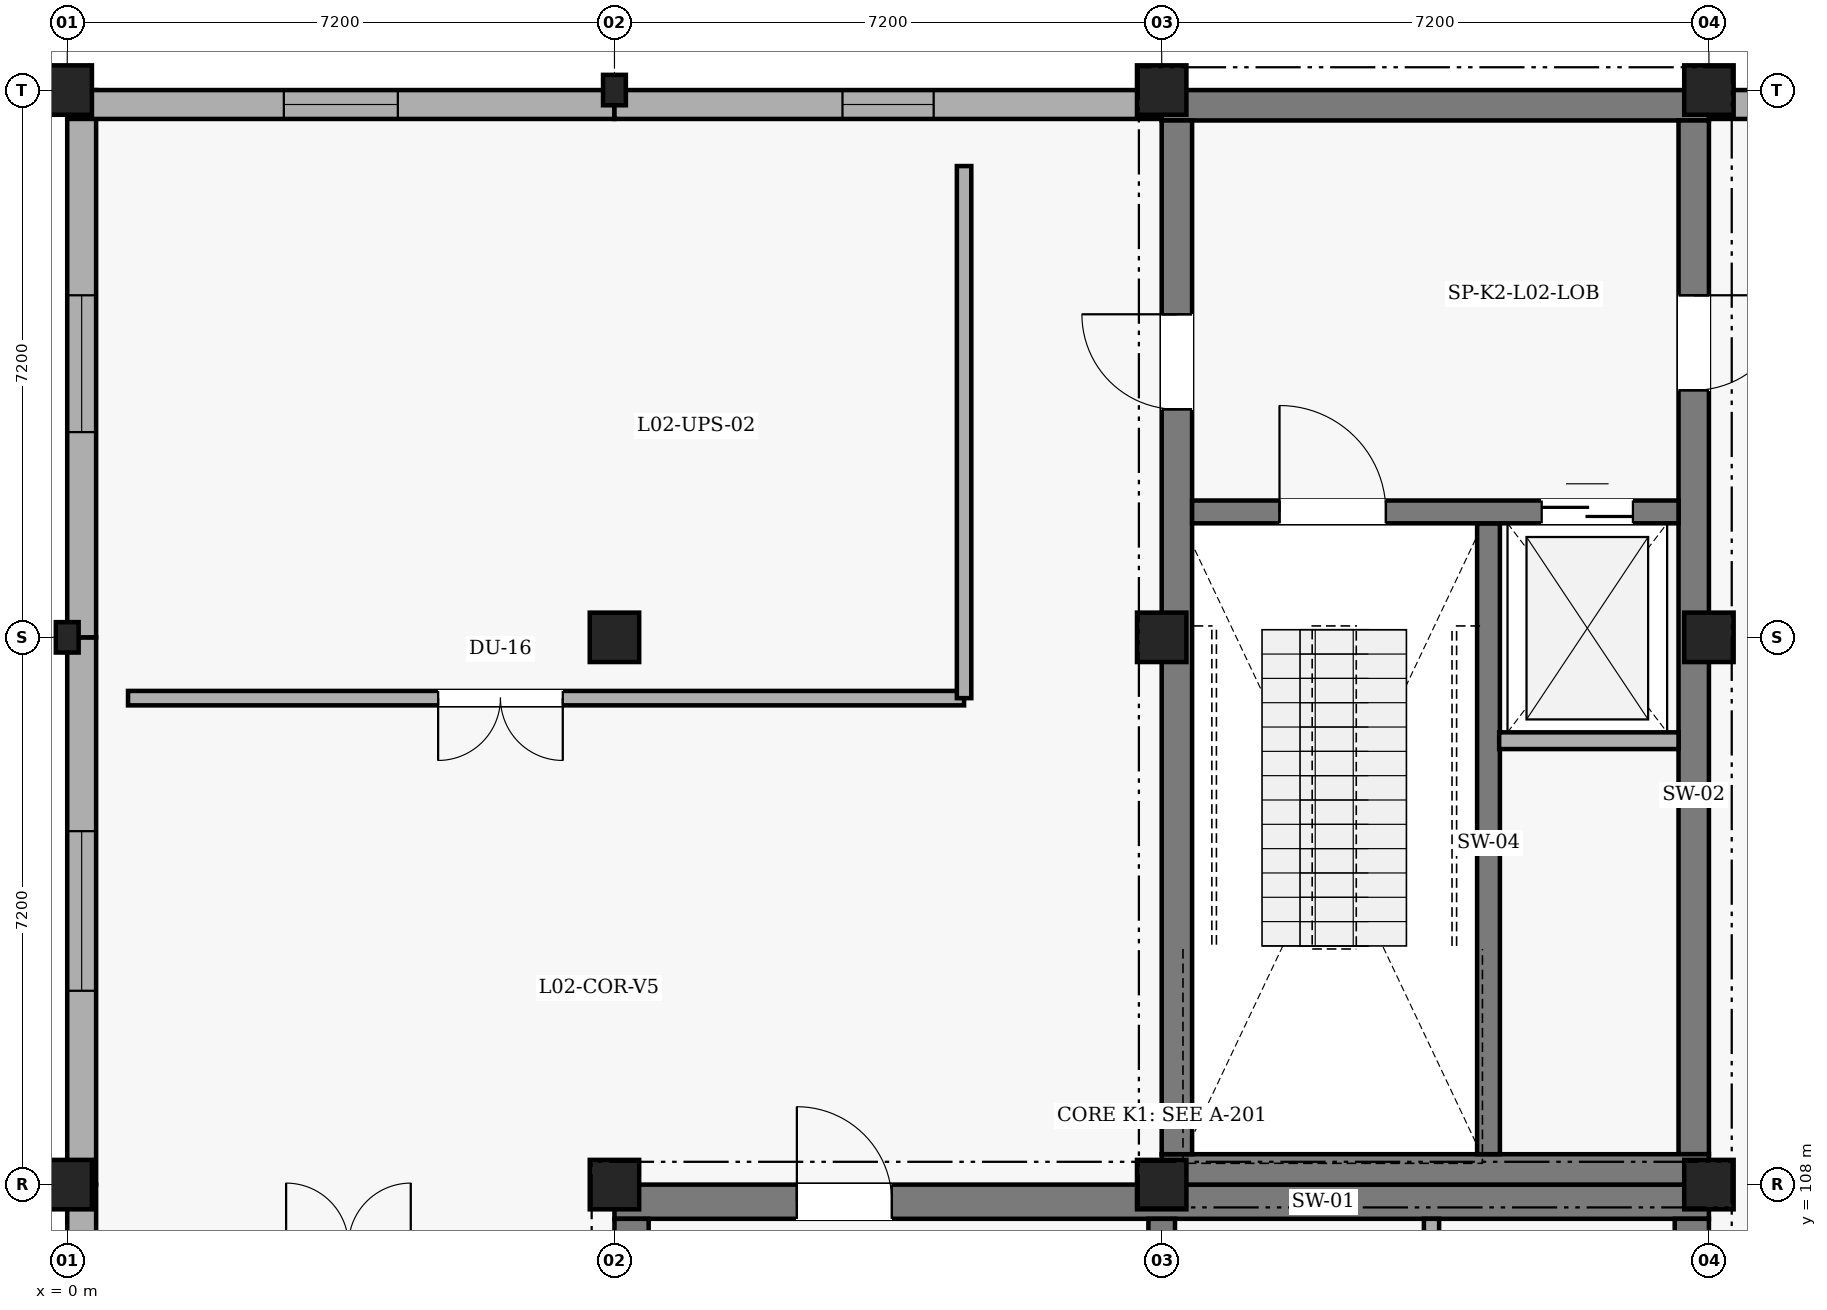
"""IFC4 building model, lengths in metres.
Left out: names, types, materials, properties, quantities, classifications, styles, units other than length and angle.
Written with IfcOpenShell. Run it as: python <this file> out.ifc"""

import sys

from ifc_helpers import new_model, si_unit, direction, frame, frame_2d, origin, origin_2d, place, context, subcontext, project, spatial, rectangle, extrude, element, fill, save


model = new_model("IFC4")
c1 = context("Model", 3, precision=1e-05, world=origin(), true_north=direction((0.0, 1.0)))
c2 = subcontext(c1, "Body", "Model", "MODEL_VIEW")
j1 = project(units=[si_unit("LENGTHUNIT", "METRE"), si_unit("PLANEANGLEUNIT", "RADIAN")], contexts=[c1])
p1 = place(None, origin())
s1 = spatial("IfcSite", under=j1, at=p1, CompositionType="ELEMENT")
p2 = place(p1, origin())
s2 = spatial("IfcBuilding", under=s1, at=p2, CompositionType="ELEMENT")
p3 = place(p2, frame((0.0, 0.0, 9.6)))
s3 = spatial("IfcBuildingStorey", under=s2, at=p3, CompositionType="ELEMENT", Elevation=9.6)
p4 = place(p3, frame((7.2, 107.775, 0.0), z_axis=(0.0, 0.0, 1.0), x_axis=(1.0, 0.0, 0.0)))
e1 = element("IfcWall", 1, at=p4, inside=s3, PredefinedType="SHEAR", context=c2, shape_type="SweptSolid", body=[
    extrude(rectangle(XDim=14.4, YDim=0.45, at=frame_2d((7.2, 0.0))), origin(), (0.0, 0.0, 1.0), 4.2),
])
p5 = place(p4, frame((2.4, 0.0, 0.0)))
e2 = element("IfcOpeningElement", 2, at=p5, cuts=e1, PredefinedType="OPENING", context=c2, shape_type="SweptSolid", body=[
    extrude(rectangle(XDim=1.25, YDim=2.2, at=frame_2d((0.625, 1.1))), frame((0.0, 0.235, 0.0), z_axis=(0.0, -1.0, 0.0), x_axis=(1.0, 0.0, 0.0)), (0.0, 0.0, 1.0), 0.47),
])
p6 = place(p3, frame((21.375, 107.55, 0.0), z_axis=(0.0, 0.0, 1.0), x_axis=(0.0, -1.0, 0.0)))
e3 = element("IfcWall", 3, at=p6, inside=s3, PredefinedType="SHEAR", context=c2, shape_type="SweptSolid", body=[
    extrude(rectangle(XDim=13.5, YDim=0.45, at=frame_2d((6.75, 0.0))), origin(), (0.0, 0.0, 1.0), 4.2),
])
p7 = place(p6, frame((9.8, 0.0, 0.0)))
e4 = element("IfcOpeningElement", 4, at=p7, cuts=e3, PredefinedType="OPENING", context=c2, shape_type="SweptSolid", body=[
    extrude(rectangle(XDim=1.0, YDim=2.15, at=frame_2d((0.5, 1.075))), frame((0.0, 0.235, 0.0), z_axis=(0.0, -1.0, 0.0), x_axis=(1.0, 0.0, 0.0)), (0.0, 0.0, 1.0), 0.47),
])
p8 = place(p6, frame((2.3, 0.0, 0.0)))
e5 = element("IfcOpeningElement", 5, at=p8, cuts=e3, PredefinedType="OPENING", context=c2, shape_type="SweptSolid", body=[
    extrude(rectangle(XDim=1.25, YDim=2.2, at=frame_2d((0.625, 1.1))), frame((0.0, 0.235, 0.0), z_axis=(0.0, -1.0, 0.0), x_axis=(1.0, 0.0, 0.0)), (0.0, 0.0, 1.0), 0.47),
])
p9 = place(p3, frame((7.425, 94.05, 0.0), z_axis=(0.0, 0.0, 1.0), x_axis=(0.0, 1.0, 0.0)))
e6 = element("IfcWall", 6, at=p9, inside=s3, PredefinedType="SHEAR", context=c2, shape_type="SweptSolid", body=[
    extrude(rectangle(XDim=13.5, YDim=0.45, at=frame_2d((6.75, 0.0))), origin(), (0.0, 0.0, 1.0), 4.2),
])
p10 = place(p3, frame((14.4, 107.55, 0.0), z_axis=(0.0, 0.0, 1.0), x_axis=(0.0, -1.0, 0.0)))
e7 = element("IfcWall", 7, at=p10, inside=s3, PredefinedType="SHEAR", context=c2, shape_type="SweptSolid", body=[
    extrude(rectangle(XDim=13.5, YDim=0.35, at=frame_2d((6.75, 0.0))), origin(), (0.0, 0.0, 1.0), 4.2),
])
p11 = place(p10, frame((1.4, 0.0, 0.0)))
e8 = element("IfcOpeningElement", 8, at=p11, cuts=e7, PredefinedType="OPENING", context=c2, shape_type="SweptSolid", body=[
    extrude(rectangle(XDim=1.25, YDim=2.2, at=frame_2d((0.625, 1.1))), frame((0.0, 0.185, 0.0), z_axis=(0.0, -1.0, 0.0), x_axis=(1.0, 0.0, 0.0)), (0.0, 0.0, 1.0), 0.37),
])
p12 = place(p3, frame((14.4, 122.2, 0.0), z_axis=(0.0, 0.0, 1.0), x_axis=(1.0, 0.0, 0.0)))
e9 = element("IfcWall", 9, at=p12, inside=s3, PredefinedType="SHEAR", context=c2, shape_type="SweptSolid", body=[
    extrude(rectangle(XDim=7.2, YDim=0.4, at=frame_2d((3.6, 0.0))), origin(), (0.0, 0.0, 1.0), 4.2),
])
p13 = place(p3, frame((21.4, 122.0, 0.0), z_axis=(0.0, 0.0, 1.0), x_axis=(0.0, -1.0, 0.0)))
e10 = element("IfcWall", 10, at=p13, inside=s3, PredefinedType="SHEAR", context=c2, shape_type="SweptSolid", body=[
    extrude(rectangle(XDim=13.6, YDim=0.4, at=frame_2d((6.8, 0.0))), origin(), (0.0, 0.0, 1.0), 4.2),
])
p14 = place(p13, frame((2.3, 0.0, 0.0)))
e11 = element("IfcOpeningElement", 11, at=p14, cuts=e10, PredefinedType="OPENING", context=c2, shape_type="SweptSolid", body=[
    extrude(rectangle(XDim=1.25, YDim=2.2, at=frame_2d((0.625, 1.1))), frame((0.0, 0.21, 0.0), z_axis=(0.0, -1.0, 0.0), x_axis=(1.0, 0.0, 0.0)), (0.0, 0.0, 1.0), 0.42),
])
p15 = place(p3, frame((21.6, 108.2, 0.0), z_axis=(0.0, 0.0, 1.0), x_axis=(-1.0, 0.0, 0.0)))
e12 = element("IfcWall", 12, at=p15, inside=s3, PredefinedType="SHEAR", context=c2, shape_type="SweptSolid", body=[
    extrude(rectangle(XDim=7.2, YDim=0.4, at=frame_2d((3.6, 0.0))), origin(), (0.0, 0.0, 1.0), 4.2),
])
p16 = place(p3, frame((14.6, 108.4, 0.0), z_axis=(0.0, 0.0, 1.0), x_axis=(0.0, 1.0, 0.0)))
e13 = element("IfcWall", 13, at=p16, inside=s3, PredefinedType="SHEAR", context=c2, shape_type="SweptSolid", body=[
    extrude(rectangle(XDim=13.6, YDim=0.4, at=frame_2d((6.8, 0.0))), origin(), (0.0, 0.0, 1.0), 4.2),
])
p17 = place(p16, frame((9.8, 0.0, 0.0)))
e14 = element("IfcOpeningElement", 14, at=p17, cuts=e13, PredefinedType="OPENING", context=c2, shape_type="SweptSolid", body=[
    extrude(rectangle(XDim=1.25, YDim=2.2, at=frame_2d((0.625, 1.1))), frame((0.0, 0.21, 0.0), z_axis=(0.0, -1.0, 0.0), x_axis=(1.0, 0.0, 0.0)), (0.0, 0.0, 1.0), 0.42),
])
p18 = place(p3, frame((18.7, 116.7, 0.0), z_axis=(0.0, 0.0, 1.0), x_axis=(0.0, -1.0, 0.0)))
e15 = element("IfcWall", 15, at=p18, inside=s3, PredefinedType="SHEAR", context=c2, shape_type="SweptSolid", body=[
    extrude(rectangle(XDim=8.3, YDim=0.3, at=frame_2d((4.15, 0.0))), origin(), (0.0, 0.0, 1.0), 4.2),
])
p19 = place(p3, frame((14.8, 116.85, 0.0), z_axis=(0.0, 0.0, 1.0), x_axis=(1.0, 0.0, 0.0)))
e16 = element("IfcWall", 16, at=p19, inside=s3, PredefinedType="SHEAR", context=c2, shape_type="SweptSolid", body=[
    extrude(rectangle(XDim=6.4, YDim=0.3, at=frame_2d((3.2, 0.0))), origin(), (0.0, 0.0, 1.0), 4.2),
])
p20 = place(p19, frame((1.15, 0.0, 0.0)))
e17 = element("IfcOpeningElement", 17, at=p20, cuts=e16, PredefinedType="OPENING", context=c2, shape_type="SweptSolid", body=[
    extrude(rectangle(XDim=1.4, YDim=2.2, at=frame_2d((0.7, 1.1))), frame((0.0, 0.16, 0.0), z_axis=(0.0, -1.0, 0.0), x_axis=(1.0, 0.0, 0.0)), (0.0, 0.0, 1.0), 0.32),
])
p21 = place(p19, frame((4.6, 0.0, 0.0)))
e18 = element("IfcOpeningElement", 18, at=p21, cuts=e16, PredefinedType="OPENING", context=c2, shape_type="SweptSolid", body=[
    extrude(rectangle(XDim=1.2, YDim=2.15, at=frame_2d((0.6, 1.075))), frame((0.0, 0.16, 0.0), z_axis=(0.0, -1.0, 0.0), x_axis=(1.0, 0.0, 0.0)), (0.0, 0.0, 1.0), 0.32),
])
p22 = place(p3, frame((0.0, 108.0, 0.0), z_axis=(0.0, 0.0, 1.0), x_axis=(1.0, 0.0, 0.0)))
e19 = element("IfcColumn", 19, at=p22, inside=s3, PredefinedType="COLUMN", context=c2, shape_type="SweptSolid", body=[
    extrude(rectangle(XDim=0.65, YDim=0.65, at=origin_2d()), origin(), (0.0, 0.0, 1.0), 3.88),
])
p23 = place(p3, frame((0.0, 115.2, 0.0), z_axis=(0.0, 0.0, 1.0), x_axis=(1.0, 0.0, 0.0)))
e20 = element("IfcColumn", 20, at=p23, inside=s3, PredefinedType="PILASTER", context=c2, shape_type="SweptSolid", body=[
    extrude(rectangle(XDim=0.3, YDim=0.4, at=origin_2d()), origin(), (0.0, 0.0, 1.0), 3.88),
])
for number, where, z_axis, x_axis in (
    (21, (0.0, 122.4, 0.0), (0.0, 0.0, 1.0), (1.0, 0.0, 0.0)),
    (22, (7.2, 108.0, 0.0), (0.0, 0.0, 1.0), (1.0, 0.0, 0.0)),
    (23, (7.2, 115.2, 0.0), (0.0, 0.0, 1.0), (1.0, 0.0, 0.0)),
):
    element("IfcColumn", number, at=place(p3, frame(where, z_axis=z_axis, x_axis=x_axis)), inside=s3, PredefinedType="COLUMN", context=c2, shape_type="SweptSolid", body=[
        extrude(rectangle(XDim=0.65, YDim=0.65, at=origin_2d()), origin(), (0.0, 0.0, 1.0), 3.88),
    ])
p24 = place(p3, frame((7.2, 122.4, 0.0), z_axis=(0.0, 0.0, 1.0), x_axis=(1.0, 0.0, 0.0)))
e24 = element("IfcColumn", 24, at=p24, inside=s3, PredefinedType="PILASTER", context=c2, shape_type="SweptSolid", body=[
    extrude(rectangle(XDim=0.3, YDim=0.4, at=origin_2d()), origin(), (0.0, 0.0, 1.0), 3.88),
])
for number, where, z_axis, x_axis in (
    (25, (14.4, 108.0, 0.0), (0.0, 0.0, 1.0), (1.0, 0.0, 0.0)),
    (26, (14.4, 115.2, 0.0), (0.0, 0.0, 1.0), (1.0, 0.0, 0.0)),
    (27, (14.4, 122.4, 0.0), (0.0, 0.0, 1.0), (1.0, 0.0, 0.0)),
    (28, (21.6, 108.0, 0.0), (0.0, 0.0, 1.0), (1.0, 0.0, 0.0)),
    (29, (21.6, 115.2, 0.0), (0.0, 0.0, 1.0), (1.0, 0.0, 0.0)),
    (30, (21.6, 122.4, 0.0), (0.0, 0.0, 1.0), (1.0, 0.0, 0.0)),
):
    element("IfcColumn", number, at=place(p3, frame(where, z_axis=z_axis, x_axis=x_axis)), inside=s3, PredefinedType="COLUMN", context=c2, shape_type="SweptSolid", body=[
        extrude(rectangle(XDim=0.65, YDim=0.65, at=origin_2d()), origin(), (0.0, 0.0, 1.0), 3.88),
    ])
p25 = place(p3, frame((0.19, 100.8, 0.0), z_axis=(0.0, 0.0, 1.0), x_axis=(0.0, 1.0, 0.0)))
e31 = element("IfcWall", 31, at=p25, inside=s3, PredefinedType="SOLIDWALL", context=c2, shape_type="SweptSolid", body=[
    extrude(rectangle(XDim=7.2, YDim=0.38, at=frame_2d((3.6, 0.0))), origin(), (0.0, 0.0, 1.0), 3.58),
])
p26 = place(p25, frame((2.4, 0.0, 0.9)))
e32 = element("IfcOpeningElement", 32, at=p26, cuts=e31, PredefinedType="OPENING", context=c2, shape_type="SweptSolid", body=[
    extrude(rectangle(XDim=2.4, YDim=1.0, at=frame_2d((1.2, 0.5))), frame((0.0, 0.2, 0.0), z_axis=(0.0, -1.0, 0.0), x_axis=(1.0, 0.0, 0.0)), (0.0, 0.0, 1.0), 0.4),
])
p27 = place(p3, frame((0.19, 108.0, 0.0), z_axis=(0.0, 0.0, 1.0), x_axis=(0.0, 1.0, 0.0)))
e33 = element("IfcWall", 33, at=p27, inside=s3, PredefinedType="SOLIDWALL", context=c2, shape_type="SweptSolid", body=[
    extrude(rectangle(XDim=7.2, YDim=0.38, at=frame_2d((3.6, 0.0))), origin(), (0.0, 0.0, 1.0), 3.58),
])
p28 = place(p27, frame((2.55, 0.0, 0.9)))
e34 = element("IfcOpeningElement", 34, at=p28, cuts=e33, PredefinedType="OPENING", context=c2, shape_type="SweptSolid", body=[
    extrude(rectangle(XDim=2.1, YDim=1.8, at=frame_2d((1.05, 0.9))), frame((0.0, 0.2, 0.0), z_axis=(0.0, -1.0, 0.0), x_axis=(1.0, 0.0, 0.0)), (0.0, 0.0, 1.0), 0.4),
])
p29 = place(p3, frame((0.19, 115.2, 0.0), z_axis=(0.0, 0.0, 1.0), x_axis=(0.0, 1.0, 0.0)))
e35 = element("IfcWall", 35, at=p29, inside=s3, PredefinedType="SOLIDWALL", context=c2, shape_type="SweptSolid", body=[
    extrude(rectangle(XDim=7.2, YDim=0.38, at=frame_2d((3.6, 0.0))), origin(), (0.0, 0.0, 1.0), 3.58),
])
p30 = place(p29, frame((2.7, 0.0, 0.9)))
e36 = element("IfcOpeningElement", 36, at=p30, cuts=e35, PredefinedType="OPENING", context=c2, shape_type="SweptSolid", body=[
    extrude(rectangle(XDim=1.8, YDim=1.5, at=frame_2d((0.9, 0.75))), frame((0.0, 0.2, 0.0), z_axis=(0.0, -1.0, 0.0), x_axis=(1.0, 0.0, 0.0)), (0.0, 0.0, 1.0), 0.4),
])
p31 = place(p3, frame((0.0, 122.21, 0.0), z_axis=(0.0, 0.0, 1.0), x_axis=(1.0, 0.0, 0.0)))
e37 = element("IfcWall", 37, at=p31, inside=s3, PredefinedType="SOLIDWALL", context=c2, shape_type="SweptSolid", body=[
    extrude(rectangle(XDim=7.2, YDim=0.38, at=frame_2d((3.6, 0.0))), origin(), (0.0, 0.0, 1.0), 3.58),
])
p32 = place(p31, frame((2.85, 0.0, 0.9)))
e38 = element("IfcOpeningElement", 38, at=p32, cuts=e37, PredefinedType="OPENING", context=c2, shape_type="SweptSolid", body=[
    extrude(rectangle(XDim=1.5, YDim=1.4, at=frame_2d((0.75, 0.7))), frame((0.0, 0.2, 0.0), z_axis=(0.0, -1.0, 0.0), x_axis=(1.0, 0.0, 0.0)), (0.0, 0.0, 1.0), 0.4),
])
p33 = place(p3, frame((7.2, 122.21, 0.0), z_axis=(0.0, 0.0, 1.0), x_axis=(1.0, 0.0, 0.0)))
e39 = element("IfcWall", 39, at=p33, inside=s3, PredefinedType="SOLIDWALL", context=c2, shape_type="SweptSolid", body=[
    extrude(rectangle(XDim=7.2, YDim=0.38, at=frame_2d((3.6, 0.0))), origin(), (0.0, 0.0, 1.0), 3.58),
])
p34 = place(p33, frame((3.0, 0.0, 0.9)))
e40 = element("IfcOpeningElement", 40, at=p34, cuts=e39, PredefinedType="OPENING", context=c2, shape_type="SweptSolid", body=[
    extrude(rectangle(XDim=1.2, YDim=1.3, at=frame_2d((0.6, 0.65))), frame((0.0, 0.2, 0.0), z_axis=(0.0, -1.0, 0.0), x_axis=(1.0, 0.0, 0.0)), (0.0, 0.0, 1.0), 0.4),
])
p35 = place(p3, frame((21.6, 122.21, 0.0), z_axis=(0.0, 0.0, 1.0), x_axis=(1.0, 0.0, 0.0)))
e41 = element("IfcWall", 41, at=p35, inside=s3, PredefinedType="SOLIDWALL", context=c2, shape_type="SweptSolid", body=[
    extrude(rectangle(XDim=7.2, YDim=0.38, at=frame_2d((3.6, 0.0))), origin(), (0.0, 0.0, 1.0), 3.58),
])
p36 = place(p35, frame((3.05, 0.0, 0.9)))
e42 = element("IfcOpeningElement", 42, at=p36, cuts=e41, PredefinedType="OPENING", context=c2, shape_type="SweptSolid", body=[
    extrude(rectangle(XDim=1.1, YDim=1.2, at=frame_2d((0.55, 0.6))), frame((0.0, 0.2, 0.0), z_axis=(0.0, -1.0, 0.0), x_axis=(1.0, 0.0, 0.0)), (0.0, 0.0, 1.0), 0.4),
])
p37 = place(p3, frame((17.95, 102.56, 0.0), z_axis=(0.0, 0.0, 1.0), x_axis=(0.0, 1.0, 0.0)))
e43 = element("IfcWall", 43, at=p37, inside=s3, PredefinedType="PARTITIONING", context=c2, shape_type="SweptSolid", body=[
    extrude(rectangle(XDim=4.99, YDim=0.2, at=frame_2d((2.495, 0.0))), origin(), (0.0, 0.0, 1.0), 3.85),
])
p38 = place(p37, frame((1.6, 0.0, 0.0)))
e44 = element("IfcOpeningElement", 44, at=p38, cuts=e43, PredefinedType="OPENING", context=c2, shape_type="SweptSolid", body=[
    extrude(rectangle(XDim=1.25, YDim=2.2, at=frame_2d((0.625, 1.1))), frame((0.0, 0.11, 0.0), z_axis=(0.0, -1.0, 0.0), x_axis=(1.0, 0.0, 0.0)), (0.0, 0.0, 1.0), 0.22),
])
p39 = place(p3, frame((18.84, 113.84, 0.0), z_axis=(0.0, 0.0, 1.0), x_axis=(1.0, 0.0, 0.0)))
e45 = element("IfcWall", 45, at=p39, inside=s3, PredefinedType="PARTITIONING", context=c2, shape_type="SweptSolid", body=[
    extrude(rectangle(XDim=2.36, YDim=0.22, at=frame_2d((1.18, 0.0))), origin(), (0.0, 0.0, 1.0), 3.85),
])
p40 = place(p3, frame((11.8, 114.4, 0.0), z_axis=(0.0, 0.0, 1.0), x_axis=(-1.0, 0.0, 0.0)))
e46 = element("IfcWall", 46, at=p40, inside=s3, PredefinedType="PARTITIONING", context=c2, shape_type="SweptSolid", body=[
    extrude(rectangle(XDim=11.0, YDim=0.19, at=frame_2d((5.5, 0.0))), origin(), (0.0, 0.0, 1.0), 3.43),
])
p41 = place(p40, frame((5.28, 0.0, 0.0)))
e47 = element("IfcOpeningElement", 47, at=p41, cuts=e46, PredefinedType="OPENING", context=c2, shape_type="SweptSolid", body=[
    extrude(rectangle(XDim=1.64, YDim=2.2, at=frame_2d((0.82, 1.1))), frame((0.0, 0.105, 0.0), z_axis=(0.0, -1.0, 0.0), x_axis=(1.0, 0.0, 0.0)), (0.0, 0.0, 1.0), 0.21),
])
p42 = place(p3, frame((11.8, 121.4, 0.0), z_axis=(0.0, 0.0, 1.0), x_axis=(0.0, -1.0, 0.0)))
e48 = element("IfcWall", 48, at=p42, inside=s3, PredefinedType="PARTITIONING", context=c2, shape_type="SweptSolid", body=[
    extrude(rectangle(XDim=7.0, YDim=0.19, at=frame_2d((3.5, 0.0))), origin(), (0.0, 0.0, 1.0), 3.43),
])
p43 = place(p28, origin())
e49 = element("IfcWindow", 49, at=p43, inside=s3, PartitioningType="SINGLE_PANEL", PredefinedType="WINDOW", context=c2, shape_type="SweptSolid", body=[
    extrude(rectangle(XDim=2.1, YDim=1.8, at=frame_2d((1.05, 0.9))), frame((0.0, 0.03, 0.0), z_axis=(0.0, -1.0, 0.0), x_axis=(1.0, 0.0, 0.0)), (0.0, 0.0, 1.0), 0.06),
])
fill(e34, e49)
p44 = place(p30, origin())
e50 = element("IfcWindow", 50, at=p44, inside=s3, PartitioningType="SINGLE_PANEL", PredefinedType="WINDOW", context=c2, shape_type="SweptSolid", body=[
    extrude(rectangle(XDim=1.8, YDim=1.5, at=frame_2d((0.9, 0.75))), frame((0.0, 0.03, 0.0), z_axis=(0.0, -1.0, 0.0), x_axis=(1.0, 0.0, 0.0)), (0.0, 0.0, 1.0), 0.06),
])
fill(e36, e50)
p45 = place(p32, origin())
e51 = element("IfcWindow", 51, at=p45, inside=s3, PartitioningType="SINGLE_PANEL", PredefinedType="WINDOW", context=c2, shape_type="SweptSolid", body=[
    extrude(rectangle(XDim=1.5, YDim=1.4, at=frame_2d((0.75, 0.7))), frame((0.0, 0.03, 0.0), z_axis=(0.0, -1.0, 0.0), x_axis=(1.0, 0.0, 0.0)), (0.0, 0.0, 1.0), 0.06),
])
fill(e38, e51)
p46 = place(p34, origin())
e52 = element("IfcWindow", 52, at=p46, inside=s3, PartitioningType="SINGLE_PANEL", PredefinedType="WINDOW", context=c2, shape_type="SweptSolid", body=[
    extrude(rectangle(XDim=1.2, YDim=1.3, at=frame_2d((0.6, 0.65))), frame((0.0, 0.03, 0.0), z_axis=(0.0, -1.0, 0.0), x_axis=(1.0, 0.0, 0.0)), (0.0, 0.0, 1.0), 0.06),
])
fill(e40, e52)
p47 = place(p5, origin())
e53 = element("IfcDoor", 53, at=p47, inside=s3, OperationType="SINGLE_SWING_LEFT", PredefinedType="DOOR", context=c2, shape_type="SweptSolid", body=[
    extrude(rectangle(XDim=1.25, YDim=2.2, at=frame_2d((0.625, 1.1))), frame((0.0, 0.025, 0.0), z_axis=(0.0, -1.0, 0.0), x_axis=(1.0, 0.0, 0.0)), (0.0, 0.0, 1.0), 0.05),
])
fill(e2, e53)
p48 = place(p20, origin())
e54 = element("IfcDoor", 54, at=p48, inside=s3, OperationType="SINGLE_SWING_LEFT", PredefinedType="DOOR", context=c2, shape_type="SweptSolid", body=[
    extrude(rectangle(XDim=1.4, YDim=2.2, at=frame_2d((0.7, 1.1))), frame((0.0, 0.025, 0.0), z_axis=(0.0, -1.0, 0.0), x_axis=(1.0, 0.0, 0.0)), (0.0, 0.0, 1.0), 0.05),
])
fill(e17, e54)
p49 = place(p21, origin())
e55 = element("IfcDoor", 55, at=p49, inside=s3, OperationType="DOUBLE_DOOR_SLIDING", PredefinedType="DOOR", context=c2, shape_type="SweptSolid", body=[
    extrude(rectangle(XDim=1.2, YDim=2.15, at=frame_2d((0.6, 1.075))), frame((0.0, 0.025, 0.0), z_axis=(0.0, -1.0, 0.0), x_axis=(1.0, 0.0, 0.0)), (0.0, 0.0, 1.0), 0.05),
])
fill(e18, e55)
p50 = place(p17, origin())
e56 = element("IfcDoor", 56, at=p50, inside=s3, OperationType="SINGLE_SWING_RIGHT", PredefinedType="DOOR", context=c2, shape_type="SweptSolid", body=[
    extrude(rectangle(XDim=1.25, YDim=2.2, at=frame_2d((0.625, 1.1))), frame((0.0, 0.025, 0.0), z_axis=(0.0, -1.0, 0.0), x_axis=(1.0, 0.0, 0.0)), (0.0, 0.0, 1.0), 0.05),
])
fill(e14, e56)
p51 = place(p14, origin())
e57 = element("IfcDoor", 57, at=p51, inside=s3, OperationType="SINGLE_SWING_LEFT", PredefinedType="DOOR", context=c2, shape_type="SweptSolid", body=[
    extrude(rectangle(XDim=1.25, YDim=2.2, at=frame_2d((0.625, 1.1))), frame((0.0, 0.025, 0.0), z_axis=(0.0, -1.0, 0.0), x_axis=(1.0, 0.0, 0.0)), (0.0, 0.0, 1.0), 0.05),
])
fill(e11, e57)
p52 = place(p41, origin())
e58 = element("IfcDoor", 58, at=p52, inside=s3, OperationType="DOUBLE_DOOR_SINGLE_SWING", PredefinedType="DOOR", context=c2, shape_type="SweptSolid", body=[
    extrude(rectangle(XDim=1.64, YDim=2.2, at=frame_2d((0.82, 1.1))), frame((0.0, 0.025, 0.0), z_axis=(0.0, -1.0, 0.0), x_axis=(1.0, 0.0, 0.0)), (0.0, 0.0, 1.0), 0.05),
])
fill(e47, e58)
save(model, sys.argv[1])
